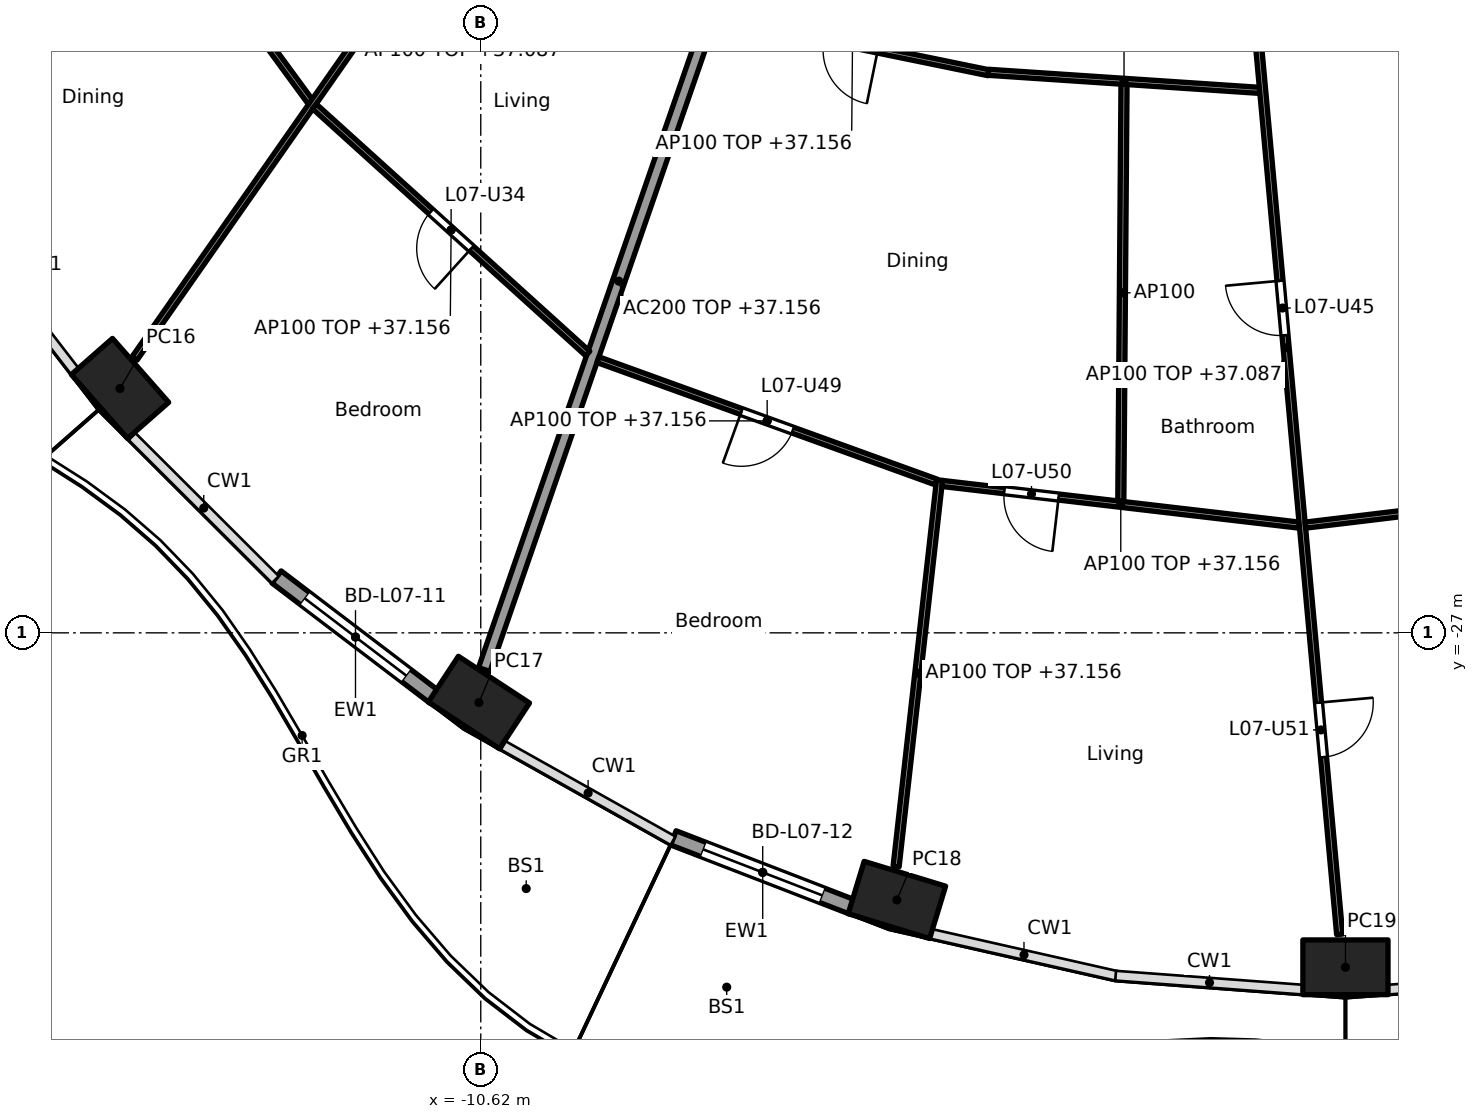
"""IFC4 building model, lengths in metres.
Left out: names, types, materials, properties, quantities, classifications, styles, units other than length and angle.
Written with IfcOpenShell. Run it as: python <this file> out.ifc"""

import sys

from ifc_helpers import new_model, si_unit, direction, frame, frame_2d, origin, origin_2d, place, context, subcontext, project, spatial, rectangle, hollow_rectangle, extrude, element, fill, save


model = new_model("IFC4")
c1 = context("Model", 3, precision=1e-05, world=origin(), true_north=direction((0.0, 1.0)))
c2 = subcontext(c1, "Body", "Model", "MODEL_VIEW")
j1 = project(units=[si_unit("LENGTHUNIT", "METRE"), si_unit("PLANEANGLEUNIT", "RADIAN")], contexts=[c1])
p1 = place(None, origin())
s1 = spatial("IfcSite", under=j1, at=p1, CompositionType="ELEMENT")
p2 = place(p1, origin())
s2 = spatial("IfcBuilding", under=s1, at=p2, CompositionType="ELEMENT")
p3 = place(p2, frame((0.0, 0.0, 34.4)))
s3 = spatial("IfcBuildingStorey", under=s2, at=p3, CompositionType="ELEMENT", Elevation=34.4)
for number, where, z_axis, x_axis in (
    (1, (-16.552, -22.981, 0.0), (0.0, 0.0, 1.0), (0.66, -0.751, 0.0)),
    (2, (-10.65, -28.146, 0.0), (0.0, 0.0, 1.0), (0.836, -0.549, 0.0)),
    (3, (-3.776, -31.393, 0.0), (0.0, 0.0, 1.0), (0.957, -0.292, 0.0)),
    (4, (3.6, -32.5, 0.0), (0.0, 0.0, 1.0), (1.0, 0.0, 0.0)),
):
    element("IfcColumn", number, at=place(p3, frame(where, z_axis=z_axis, x_axis=x_axis)), inside=s3, PredefinedType="COLUMN", context=c2, shape_type="SweptSolid", body=[
        extrude(hollow_rectangle(XDim=1.4, YDim=0.9, WallThickness=0.05, at=origin_2d()), origin(), (0.0, 0.0, 1.0), 3.7),
    ])
p4 = place(p3, frame((-11.382, -28.056, 0.0), z_axis=(0.0, 0.0, 1.0), x_axis=(-0.796022293214, 0.605267303517, 0.0)))
e5 = element("IfcWall", 5, at=p4, inside=s3, PredefinedType="SOLIDWALL", context=c2, shape_type="SweptSolid", body=[
    extrude(rectangle(XDim=3.262, YDim=0.25, at=frame_2d((1.631, 0.0))), origin(), (0.0, 0.0, 1.0), 3.44),
])
p5 = place(p4, frame((0.581, 0.0, 0.0)))
e6 = element("IfcOpeningElement", 6, at=p5, cuts=e5, PredefinedType="OPENING", context=c2, shape_type="SweptSolid", body=[
    extrude(rectangle(XDim=2.1, YDim=2.4, at=frame_2d((1.05, 1.2))), frame((0.0, 0.135, 0.0), z_axis=(0.0, -1.0, 0.0), x_axis=(1.0, 0.0, 0.0)), (0.0, 0.0, 1.0), 0.27),
])
p6 = place(p3, frame((-4.514, -31.507, 0.0), z_axis=(0.0, 0.0, 1.0), x_axis=(-0.932809381943, 0.360370166577, 0.0)))
e7 = element("IfcWall", 7, at=p6, inside=s3, PredefinedType="SOLIDWALL", context=c2, shape_type="SweptSolid", body=[
    extrude(rectangle(XDim=3.151, YDim=0.25, at=frame_2d((1.575, 0.0))), origin(), (0.0, 0.0, 1.0), 3.44),
])
p7 = place(p6, frame((0.525, 0.0, 0.0)))
e8 = element("IfcOpeningElement", 8, at=p7, cuts=e7, PredefinedType="OPENING", context=c2, shape_type="SweptSolid", body=[
    extrude(rectangle(XDim=2.1, YDim=2.4, at=frame_2d((1.05, 1.2))), frame((0.0, 0.135, 0.0), z_axis=(0.0, -1.0, 0.0), x_axis=(1.0, 0.0, 0.0)), (0.0, 0.0, 1.0), 0.27),
])
p8 = place(p3, frame((-6.139, -14.829, 0.0), z_axis=(0.0, 0.0, 1.0), x_axis=(-0.327178799566, -0.944962450637, 0.0)))
e9 = element("IfcWall", 9, at=p8, inside=s3, PredefinedType="PARTITIONING", context=c2, shape_type="SweptSolid", body=[
    extrude(rectangle(XDim=13.517, YDim=0.2, at=frame_2d((6.759, 0.0))), origin(), (0.0, 0.0, 1.0), 2.756),
])
p9 = place(p3, frame((-17.152, -13.18, 0.0), z_axis=(0.0, 0.0, 1.0), x_axis=(0.591222750954, -0.806508312886, 0.0)))
e10 = element("IfcWall", 10, at=p9, inside=s3, PredefinedType="PARTITIONING", context=c2, shape_type="SweptSolid", body=[
    extrude(rectangle(XDim=6.31, YDim=0.1, at=frame_2d((3.155, 0.0))), origin(), (0.0, 0.0, 1.0), 2.756),
])
p10 = place(p9, frame((2.705, 0.0, 0.0)))
e11 = element("IfcOpeningElement", 11, at=p10, cuts=e10, PredefinedType="OPENING", context=c2, shape_type="SweptSolid", body=[
    extrude(rectangle(XDim=0.9, YDim=2.1, at=frame_2d((0.45, 1.05))), frame((0.0, 0.06, 0.0), z_axis=(0.0, -1.0, 0.0), x_axis=(1.0, 0.0, 0.0)), (0.0, 0.0, 1.0), 0.12),
])
p11 = place(p3, frame((-7.715, -10.193, 0.0), z_axis=(0.0, 0.0, 1.0), x_axis=(-0.573126964124, -0.819466584428, 0.0)))
e12 = element("IfcWall", 12, at=p11, inside=s3, PredefinedType="PARTITIONING", context=c2, shape_type="SweptSolid", body=[
    extrude(rectangle(XDim=15.001, YDim=0.1, at=frame_2d((7.5, 0.0))), origin(), (0.0, 0.0, 1.0), 2.687),
])
p12 = place(p11, frame((1.678, 0.0, 0.0)))
e13 = element("IfcOpeningElement", 13, at=p12, cuts=e12, PredefinedType="OPENING", context=c2, shape_type="SweptSolid", body=[
    extrude(rectangle(XDim=0.9, YDim=2.1, at=frame_2d((0.45, 1.05))), frame((0.0, 0.06, 0.0), z_axis=(0.0, -1.0, 0.0), x_axis=(1.0, 0.0, 0.0)), (0.0, 0.0, 1.0), 0.12),
])
p13 = place(p11, frame((6.631, 0.0, 0.0)))
e14 = element("IfcOpeningElement", 14, at=p13, cuts=e12, PredefinedType="OPENING", context=c2, shape_type="SweptSolid", body=[
    extrude(rectangle(XDim=0.9, YDim=2.1, at=frame_2d((0.45, 1.05))), frame((0.0, 0.06, 0.0), z_axis=(0.0, -1.0, 0.0), x_axis=(1.0, 0.0, 0.0)), (0.0, 0.0, 1.0), 0.12),
])
p14 = place(p3, frame((-13.355, -18.343, 0.0), z_axis=(0.0, 0.0, 1.0), x_axis=(0.741713303551, -0.670717060567, 0.0)))
e15 = element("IfcWall", 15, at=p14, inside=s3, PredefinedType="PARTITIONING", context=c2, shape_type="SweptSolid", body=[
    extrude(rectangle(XDim=6.059, YDim=0.1, at=frame_2d((3.03, 0.0))), origin(), (0.0, 0.0, 1.0), 2.756),
])
p15 = place(p14, frame((2.58, 0.0, 0.0)))
e16 = element("IfcOpeningElement", 16, at=p15, cuts=e15, PredefinedType="OPENING", context=c2, shape_type="SweptSolid", body=[
    extrude(rectangle(XDim=0.9, YDim=2.1, at=frame_2d((0.45, 1.05))), frame((0.0, 0.06, 0.0), z_axis=(0.0, -1.0, 0.0), x_axis=(1.0, 0.0, 0.0)), (0.0, 0.0, 1.0), 0.12),
])
p16 = place(p3, frame((-6.741, -16.872, 0.0), z_axis=(0.0, 0.0, 1.0), x_axis=(0.979595137747, -0.200981009307, 0.0)))
e17 = element("IfcWall", 17, at=p16, inside=s3, PredefinedType="PARTITIONING", context=c2, shape_type="SweptSolid", body=[
    extrude(rectangle(XDim=4.562, YDim=0.1, at=frame_2d((2.281, 0.0))), origin(), (0.0, 0.0, 1.0), 2.756),
])
p17 = place(p16, frame((1.806, 0.0, 0.0)))
e18 = element("IfcOpeningElement", 18, at=p17, cuts=e17, PredefinedType="OPENING", context=c2, shape_type="SweptSolid", body=[
    extrude(rectangle(XDim=0.9, YDim=2.1, at=frame_2d((0.45, 1.05))), frame((0.0, 0.06, 0.0), z_axis=(0.0, -1.0, 0.0), x_axis=(1.0, 0.0, 0.0)), (0.0, 0.0, 1.0), 0.12),
])
p18 = place(p3, frame((-8.692, -22.508, 0.0), z_axis=(0.0, 0.0, 1.0), x_axis=(0.940401494588, -0.340066212636, 0.0)))
e19 = element("IfcWall", 19, at=p18, inside=s3, PredefinedType="PARTITIONING", context=c2, shape_type="SweptSolid", body=[
    extrude(rectangle(XDim=5.917, YDim=0.1, at=frame_2d((2.958, 0.0))), origin(), (0.0, 0.0, 1.0), 2.756),
])
p19 = place(p18, frame((2.509, 0.0, 0.0)))
e20 = element("IfcOpeningElement", 20, at=p19, cuts=e19, PredefinedType="OPENING", context=c2, shape_type="SweptSolid", body=[
    extrude(rectangle(XDim=0.9, YDim=2.1, at=frame_2d((0.45, 1.05))), frame((0.0, 0.06, 0.0), z_axis=(0.0, -1.0, 0.0), x_axis=(1.0, 0.0, 0.0)), (0.0, 0.0, 1.0), 0.12),
])
p20 = place(p3, frame((-2.271, -17.782, 0.0), z_axis=(0.0, 0.0, 1.0), x_axis=(0.997791437766, -0.066424744789, 0.0)))
e21 = element("IfcWall", 21, at=p20, inside=s3, PredefinedType="PARTITIONING", context=c2, shape_type="SweptSolid", body=[
    extrude(rectangle(XDim=4.469, YDim=0.1, at=frame_2d((2.235, 0.0))), origin(), (0.0, 0.0, 1.0), 2.756),
])
p21 = place(p3, frame((-3.075, -24.488, 0.0), z_axis=(0.0, 0.0, 1.0), x_axis=(-0.111705235978, -0.993741384997, 0.0)))
e22 = element("IfcWall", 22, at=p21, inside=s3, PredefinedType="PARTITIONING", context=c2, shape_type="SweptSolid", body=[
    extrude(rectangle(XDim=6.395, YDim=0.1, at=frame_2d((3.198, 0.0))), origin(), (0.0, 0.0, 1.0), 2.756),
])
p22 = place(p3, frame((-3.031, -24.543, 0.0), z_axis=(0.0, 0.0, 1.0), x_axis=(0.993255612046, -0.115945198862, 0.0)))
e23 = element("IfcWall", 23, at=p22, inside=s3, PredefinedType="PARTITIONING", context=c2, shape_type="SweptSolid", body=[
    extrude(rectangle(XDim=5.913, YDim=0.1, at=frame_2d((2.956, 0.0))), origin(), (0.0, 0.0, 1.0), 2.756),
])
p23 = place(p22, frame((1.028, 0.0, 0.0)))
e24 = element("IfcOpeningElement", 24, at=p23, cuts=e23, PredefinedType="OPENING", context=c2, shape_type="SweptSolid", body=[
    extrude(rectangle(XDim=0.9, YDim=2.1, at=frame_2d((0.45, 1.05))), frame((0.0, 0.06, 0.0), z_axis=(0.0, -1.0, 0.0), x_axis=(1.0, 0.0, 0.0)), (0.0, 0.0, 1.0), 0.12),
])
p24 = place(p3, frame((-0.042, -17.98, 0.0), z_axis=(0.0, 0.0, 1.0), x_axis=(-0.007692080119, -0.999970415514, 0.0)))
e25 = element("IfcWall", 25, at=p24, inside=s3, PredefinedType="PARTITIONING", context=c2, shape_type="SweptSolid", body=[
    extrude(rectangle(XDim=6.856, YDim=0.1, at=frame_2d((3.428, 0.0))), origin(), (0.0, 0.0, 1.0), 3.44),
])
p25 = place(p3, frame((1.744, -12.664, 0.0), z_axis=(0.0, 0.0, 1.0), x_axis=(0.090893639596, -0.995860605849, 0.0)))
e26 = element("IfcWall", 26, at=p25, inside=s3, PredefinedType="PARTITIONING", context=c2, shape_type="SweptSolid", body=[
    extrude(rectangle(XDim=19.374, YDim=0.1, at=frame_2d((9.687, 0.0))), origin(), (0.0, 0.0, 1.0), 2.687),
])
p26 = place(p25, frame((2.27, 0.0, 0.0)))
e27 = element("IfcOpeningElement", 27, at=p26, cuts=e26, PredefinedType="OPENING", context=c2, shape_type="SweptSolid", body=[
    extrude(rectangle(XDim=0.9, YDim=2.1, at=frame_2d((0.45, 1.05))), frame((0.0, 0.06, 0.0), z_axis=(0.0, -1.0, 0.0), x_axis=(1.0, 0.0, 0.0)), (0.0, 0.0, 1.0), 0.12),
])
p27 = place(p25, frame((8.582, 0.0, 0.0)))
e28 = element("IfcOpeningElement", 28, at=p27, cuts=e26, PredefinedType="OPENING", context=c2, shape_type="SweptSolid", body=[
    extrude(rectangle(XDim=0.9, YDim=2.1, at=frame_2d((0.45, 1.05))), frame((0.0, 0.06, 0.0), z_axis=(0.0, -1.0, 0.0), x_axis=(1.0, 0.0, 0.0)), (0.0, 0.0, 1.0), 0.12),
])
p28 = place(p25, frame((15.548, 0.0, 0.0)))
e29 = element("IfcOpeningElement", 29, at=p28, cuts=e26, PredefinedType="OPENING", context=c2, shape_type="SweptSolid", body=[
    extrude(rectangle(XDim=0.9, YDim=2.1, at=frame_2d((0.45, 1.05))), frame((0.0, 0.06, 0.0), z_axis=(0.0, -1.0, 0.0), x_axis=(1.0, 0.0, 0.0)), (0.0, 0.0, 1.0), 0.12),
])
p29 = place(p3, frame((2.941, -25.229, 0.0), z_axis=(0.0, 0.0, 1.0), x_axis=(0.992836798252, 0.119478416615, 0.0)))
e30 = element("IfcWall", 30, at=p29, inside=s3, PredefinedType="PARTITIONING", context=c2, shape_type="SweptSolid", body=[
    extrude(rectangle(XDim=6.01, YDim=0.1, at=frame_2d((3.005, 0.0))), origin(), (0.0, 0.0, 1.0), 2.756),
])
p30 = place(p5, origin())
e31 = element("IfcDoor", 31, at=p30, inside=s3, OperationType="SLIDING_TO_LEFT", PredefinedType="DOOR", context=c2, shape_type="SweptSolid", body=[
    extrude(rectangle(XDim=2.1, YDim=2.4, at=frame_2d((1.05, 1.2))), frame((0.0, 0.025, 0.0), z_axis=(0.0, -1.0, 0.0), x_axis=(1.0, 0.0, 0.0)), (0.0, 0.0, 1.0), 0.05),
])
fill(e6, e31)
p31 = place(p7, origin())
e32 = element("IfcDoor", 32, at=p31, inside=s3, OperationType="SLIDING_TO_LEFT", PredefinedType="DOOR", context=c2, shape_type="SweptSolid", body=[
    extrude(rectangle(XDim=2.1, YDim=2.4, at=frame_2d((1.05, 1.2))), frame((0.0, 0.025, 0.0), z_axis=(0.0, -1.0, 0.0), x_axis=(1.0, 0.0, 0.0)), (0.0, 0.0, 1.0), 0.05),
])
fill(e8, e32)
p32 = place(p15, frame((0.9, 0.0, 0.0), x_axis=(-1.0, 0.0, 0.0)))
e33 = element("IfcDoor", 33, at=p32, inside=s3, OperationType="SINGLE_SWING_LEFT", PredefinedType="DOOR", context=c2, shape_type="SweptSolid", body=[
    extrude(rectangle(XDim=0.9, YDim=2.1, at=frame_2d((0.45, 1.05))), frame((0.0, 0.025, 0.0), z_axis=(0.0, -1.0, 0.0), x_axis=(1.0, 0.0, 0.0)), (0.0, 0.0, 1.0), 0.05),
])
fill(e16, e33)
p33 = place(p27, frame((0.9, 0.0, 0.0), x_axis=(-1.0, 0.0, 0.0)))
e34 = element("IfcDoor", 34, at=p33, inside=s3, OperationType="SINGLE_SWING_RIGHT", PredefinedType="DOOR", context=c2, shape_type="SweptSolid", body=[
    extrude(rectangle(XDim=0.9, YDim=2.1, at=frame_2d((0.45, 1.05))), frame((0.0, 0.025, 0.0), z_axis=(0.0, -1.0, 0.0), x_axis=(1.0, 0.0, 0.0)), (0.0, 0.0, 1.0), 0.05),
])
fill(e28, e34)
p34 = place(p19, frame((0.9, 0.0, 0.0), x_axis=(-1.0, 0.0, 0.0)))
e35 = element("IfcDoor", 35, at=p34, inside=s3, OperationType="SINGLE_SWING_RIGHT", PredefinedType="DOOR", context=c2, shape_type="SweptSolid", body=[
    extrude(rectangle(XDim=0.9, YDim=2.1, at=frame_2d((0.45, 1.05))), frame((0.0, 0.025, 0.0), z_axis=(0.0, -1.0, 0.0), x_axis=(1.0, 0.0, 0.0)), (0.0, 0.0, 1.0), 0.05),
])
fill(e20, e35)
p35 = place(p23, frame((0.9, 0.0, 0.0), x_axis=(-1.0, 0.0, 0.0)))
e36 = element("IfcDoor", 36, at=p35, inside=s3, OperationType="SINGLE_SWING_LEFT", PredefinedType="DOOR", context=c2, shape_type="SweptSolid", body=[
    extrude(rectangle(XDim=0.9, YDim=2.1, at=frame_2d((0.45, 1.05))), frame((0.0, 0.025, 0.0), z_axis=(0.0, -1.0, 0.0), x_axis=(1.0, 0.0, 0.0)), (0.0, 0.0, 1.0), 0.05),
])
fill(e24, e36)
p36 = place(p28, origin())
e37 = element("IfcDoor", 37, at=p36, inside=s3, OperationType="SINGLE_SWING_LEFT", PredefinedType="DOOR", context=c2, shape_type="SweptSolid", body=[
    extrude(rectangle(XDim=0.9, YDim=2.1, at=frame_2d((0.45, 1.05))), frame((0.0, 0.025, 0.0), z_axis=(0.0, -1.0, 0.0), x_axis=(1.0, 0.0, 0.0)), (0.0, 0.0, 1.0), 0.05),
])
fill(e29, e37)
save(model, sys.argv[1])
